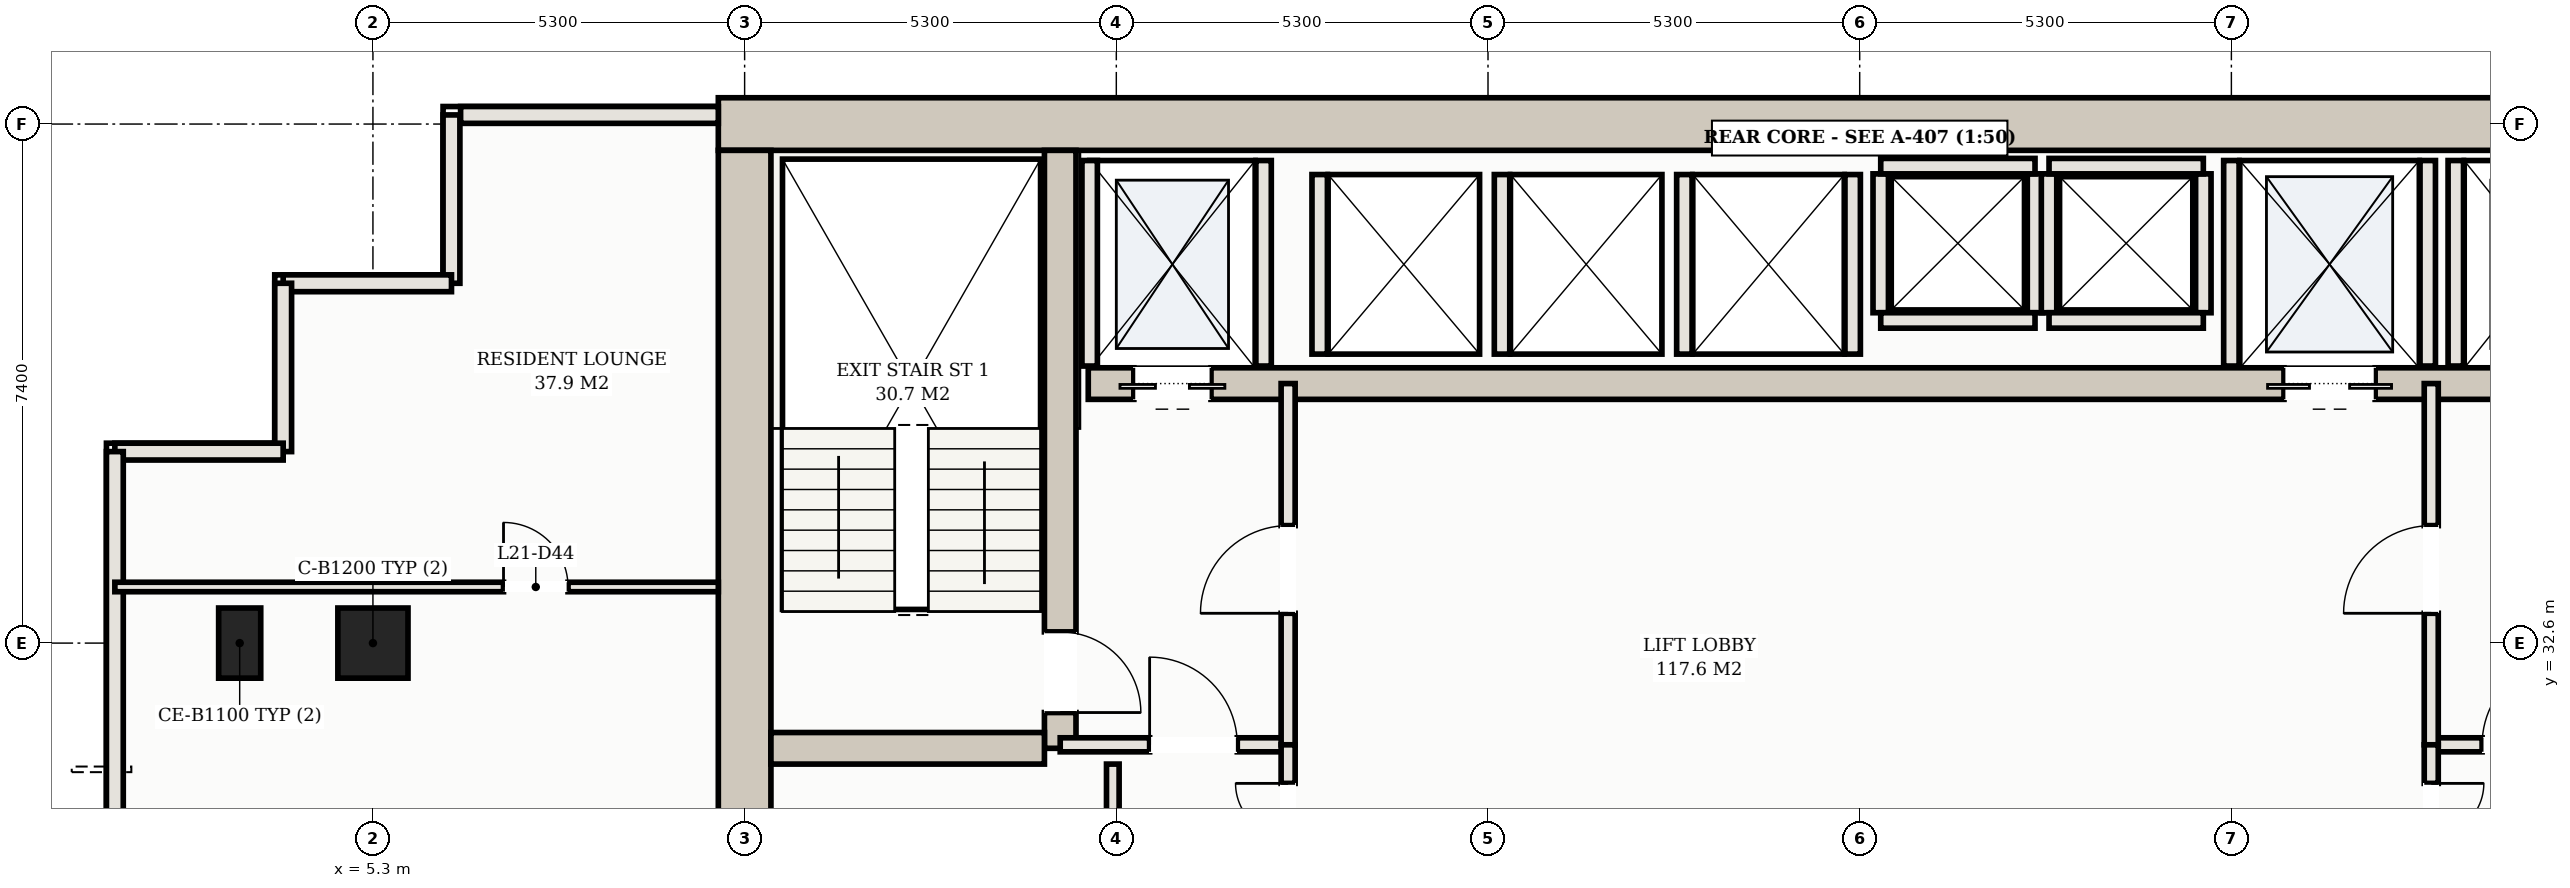
"""IFC4 building model, lengths in metres.
Left out: names, types, materials, properties, quantities, classifications, styles, units other than length and angle.
Written with IfcOpenShell. Run it as: python <this file> out.ifc"""

import sys

from ifc_helpers import new_model, si_unit, direction, frame, frame_2d, origin, origin_2d, place, context, subcontext, project, spatial, rectangle, hollow_rectangle, extrude, element, fill, save


model = new_model("IFC4")
c1 = context("Model", 3, precision=1e-05, world=origin(), true_north=direction((0.0, 1.0)))
c2 = subcontext(c1, "Body", "Model", "MODEL_VIEW")
j1 = project(units=[si_unit("LENGTHUNIT", "METRE"), si_unit("PLANEANGLEUNIT", "RADIAN")], contexts=[c1])
p1 = place(None, origin())
s1 = spatial("IfcSite", under=j1, at=p1, CompositionType="ELEMENT")
p2 = place(p1, origin())
s2 = spatial("IfcBuilding", under=s1, at=p2, CompositionType="ELEMENT")
p3 = place(p2, frame((0.0, 0.0, 81.7)))
s3 = spatial("IfcBuildingStorey", under=s2, at=p3, CompositionType="ELEMENT", Elevation=81.7)
p4 = place(p3, frame((10.225, 40.0, 0.0), z_axis=(0.0, 0.0, 1.0), x_axis=(1.0, 0.0, 0.0)))
e1 = element("IfcWall", 1, at=p4, inside=s3, PredefinedType="SHEAR", context=c2, shape_type="SweptSolid", body=[
    extrude(rectangle(XDim=32.55, YDim=0.75, at=frame_2d((16.275, 0.0))), origin(), (0.0, 0.0, 1.0), 3.09),
])
p5 = place(p3, frame((10.6, 25.575, 0.0), z_axis=(0.0, 0.0, 1.0), x_axis=(0.0, 1.0, 0.0)))
e2 = element("IfcWall", 2, at=p5, inside=s3, PredefinedType="SHEAR", context=c2, shape_type="SweptSolid", body=[
    extrude(rectangle(XDim=14.05, YDim=0.75, at=frame_2d((7.025, 0.0))), origin(), (0.0, 0.0, 1.0), 3.09),
])
p6 = place(p3, frame((15.1, 31.1, 0.0), z_axis=(0.0, 0.0, 1.0), x_axis=(0.0, 1.0, 0.0)))
e3 = element("IfcWall", 3, at=p6, inside=s3, PredefinedType="SHEAR", context=c2, shape_type="SweptSolid", body=[
    extrude(rectangle(XDim=8.525, YDim=0.45, at=frame_2d((4.262, 0.0))), origin(), (0.0, 0.0, 1.0), 3.09),
])
p7 = place(p6, frame((0.51, 0.0, 0.0)))
e4 = element("IfcOpeningElement", 4, at=p7, cuts=e3, PredefinedType="OPENING", context=c2, shape_type="SweptSolid", body=[
    extrude(rectangle(XDim=1.15, YDim=2.2, at=frame_2d((0.575, 1.1))), frame((0.0, 0.235, 0.0), z_axis=(0.0, -1.0, 0.0), x_axis=(1.0, 0.0, 0.0)), (0.0, 0.0, 1.0), 0.47),
])
p8 = place(p3, frame((10.975, 31.1, 0.0), z_axis=(0.0, 0.0, 1.0), x_axis=(1.0, 0.0, 0.0)))
e5 = element("IfcWall", 5, at=p8, inside=s3, PredefinedType="SHEAR", context=c2, shape_type="SweptSolid", body=[
    extrude(rectangle(XDim=3.9, YDim=0.45, at=frame_2d((1.95, 0.0))), origin(), (0.0, 0.0, 1.0), 3.09),
])
p9 = place(p3, frame((15.5, 36.3, 0.0), z_axis=(0.0, 0.0, 1.0), x_axis=(1.0, 0.0, 0.0)))
e6 = element("IfcWall", 6, at=p9, inside=s3, PredefinedType="SHEAR", context=c2, shape_type="SweptSolid", body=[
    extrude(rectangle(XDim=22.0, YDim=0.45, at=frame_2d((11.0, 0.0))), origin(), (0.0, 0.0, 1.0), 3.09),
])
p10 = place(p9, frame((0.65, 0.0, 0.0)))
e7 = element("IfcOpeningElement", 7, at=p10, cuts=e6, PredefinedType="OPENING", context=c2, shape_type="SweptSolid", body=[
    extrude(rectangle(XDim=1.1, YDim=2.15, at=frame_2d((0.55, 1.075))), frame((0.0, 0.235, 0.0), z_axis=(0.0, -1.0, 0.0), x_axis=(1.0, 0.0, 0.0)), (0.0, 0.0, 1.0), 0.47),
])
p11 = place(p9, frame((20.25, 0.0, 0.0)))
e8 = element("IfcOpeningElement", 8, at=p11, cuts=e6, PredefinedType="OPENING", context=c2, shape_type="SweptSolid", body=[
    extrude(rectangle(XDim=1.1, YDim=2.15, at=frame_2d((0.55, 1.075))), frame((0.0, 0.235, 0.0), z_axis=(0.0, -1.0, 0.0), x_axis=(1.0, 0.0, 0.0)), (0.0, 0.0, 1.0), 0.47),
])
p12 = place(p9, frame((17.05, 0.0, 0.0)))
e9 = element("IfcOpeningElement", 9, at=p12, cuts=e6, PredefinedType="OPENING", context=c2, shape_type="SweptSolid", body=[
    extrude(rectangle(XDim=1.3, YDim=2.2, at=frame_2d((0.65, 1.1))), frame((0.0, 0.235, 0.0), z_axis=(0.0, -1.0, 0.0), x_axis=(1.0, 0.0, 0.0)), (0.0, 0.0, 1.0), 0.47),
])
p13 = place(p3, frame((3.4, 32.6, 0.0), z_axis=(0.0, 0.0, 1.0), x_axis=(1.0, 0.0, 0.0)))
e10 = element("IfcColumn", 10, at=p13, inside=s3, PredefinedType="COLUMN", context=c2, shape_type="SweptSolid", body=[
    extrude(hollow_rectangle(XDim=0.6, YDim=1.0, WallThickness=0.032, at=origin_2d()), origin(), (0.0, 0.0, 1.0), 3.3),
])
p14 = place(p3, frame((5.3, 32.6, 0.0), z_axis=(0.0, 0.0, 1.0), x_axis=(1.0, 0.0, 0.0)))
e11 = element("IfcColumn", 11, at=p14, inside=s3, PredefinedType="COLUMN", context=c2, shape_type="SweptSolid", body=[
    extrude(hollow_rectangle(XDim=1.0, YDim=1.0, WallThickness=0.036, at=origin_2d()), origin(), (0.0, 0.0, 1.0), 3.3),
])
for number, where, z_axis, x_axis in (
    (12, (15.52, 36.55, 0.0), (0.0, 0.0, 1.0), (0.0, 1.0, 0.0)),
    (13, (18.0, 36.55, 0.0), (0.0, 0.0, 1.0), (0.0, 1.0, 0.0)),
    (14, (35.0, 36.55, 0.0), (0.0, 0.0, 1.0), (0.0, 1.0, 0.0)),
    (15, (31.8, 36.55, 0.0), (0.0, 0.0, 1.0), (0.0, 1.0, 0.0)),
    (16, (34.6, 36.55, 0.0), (0.0, 0.0, 1.0), (0.0, 1.0, 0.0)),
):
    element("IfcWall", number, at=place(p3, frame(where, z_axis=z_axis, x_axis=x_axis)), inside=s3, PredefinedType="SOLIDWALL", context=c2, shape_type="SweptSolid", body=[
        extrude(rectangle(XDim=2.93, YDim=0.22, at=frame_2d((1.465, 0.0))), origin(), (0.0, 0.0, 1.0), 3.09),
    ])
for number, where, z_axis, x_axis in (
    (17, (18.8, 36.72, 0.0), (0.0, 0.0, 1.0), (0.0, 1.0, 0.0)),
    (18, (21.4, 36.72, 0.0), (0.0, 0.0, 1.0), (0.0, 1.0, 0.0)),
    (19, (24.0, 36.72, 0.0), (0.0, 0.0, 1.0), (0.0, 1.0, 0.0)),
    (20, (26.4, 36.72, 0.0), (0.0, 0.0, 1.0), (0.0, 1.0, 0.0)),
):
    element("IfcWall", number, at=place(p3, frame(where, z_axis=z_axis, x_axis=x_axis)), inside=s3, PredefinedType="SOLIDWALL", context=c2, shape_type="SweptSolid", body=[
        extrude(rectangle(XDim=2.56, YDim=0.22, at=frame_2d((1.28, 0.0))), origin(), (0.0, 0.0, 1.0), 3.09),
    ])
for number, where, z_axis, x_axis in (
    (21, (26.8, 37.31, 0.0), (0.0, 0.0, 1.0), (0.0, 1.0, 0.0)),
    (22, (29.0, 37.31, 0.0), (0.0, 0.0, 1.0), (0.0, 1.0, 0.0)),
):
    element("IfcWall", number, at=place(p3, frame(where, z_axis=z_axis, x_axis=x_axis)), inside=s3, PredefinedType="SOLIDWALL", context=c2, shape_type="SweptSolid", body=[
        extrude(rectangle(XDim=1.98, YDim=0.22, at=frame_2d((0.99, 0.0))), origin(), (0.0, 0.0, 1.0), 3.09),
    ])
for number, where, z_axis, x_axis in (
    (23, (26.8, 39.4, 0.0), (0.0, 0.0, 1.0), (1.0, 0.0, 0.0)),
    (24, (26.8, 37.2, 0.0), (0.0, 0.0, 1.0), (1.0, 0.0, 0.0)),
):
    element("IfcWall", number, at=place(p3, frame(where, z_axis=z_axis, x_axis=x_axis)), inside=s3, PredefinedType="SOLIDWALL", context=c2, shape_type="SweptSolid", body=[
        extrude(rectangle(XDim=2.2, YDim=0.22, at=frame_2d((1.1, 0.0))), origin(), (0.0, 0.0, 1.0), 3.09),
    ])
for number, where, z_axis, x_axis in (
    (25, (29.2, 37.31, 0.0), (0.0, 0.0, 1.0), (0.0, 1.0, 0.0)),
    (26, (31.4, 37.31, 0.0), (0.0, 0.0, 1.0), (0.0, 1.0, 0.0)),
):
    element("IfcWall", number, at=place(p3, frame(where, z_axis=z_axis, x_axis=x_axis)), inside=s3, PredefinedType="SOLIDWALL", context=c2, shape_type="SweptSolid", body=[
        extrude(rectangle(XDim=1.98, YDim=0.22, at=frame_2d((0.99, 0.0))), origin(), (0.0, 0.0, 1.0), 3.09),
    ])
for number, where, z_axis, x_axis in (
    (27, (29.2, 39.4, 0.0), (0.0, 0.0, 1.0), (1.0, 0.0, 0.0)),
    (28, (29.2, 37.2, 0.0), (0.0, 0.0, 1.0), (1.0, 0.0, 0.0)),
):
    element("IfcWall", number, at=place(p3, frame(where, z_axis=z_axis, x_axis=x_axis)), inside=s3, PredefinedType="SOLIDWALL", context=c2, shape_type="SweptSolid", body=[
        extrude(rectangle(XDim=2.2, YDim=0.22, at=frame_2d((1.1, 0.0))), origin(), (0.0, 0.0, 1.0), 3.09),
    ])
p15 = place(p3, frame((10.225, 40.13, 0.0), z_axis=(0.0, 0.0, 1.0), x_axis=(-1.0, 0.0, 0.0)))
e29 = element("IfcWall", 29, at=p15, inside=s3, PredefinedType="SOLIDWALL", context=c2, shape_type="SweptSolid", body=[
    extrude(rectangle(XDim=3.675, YDim=0.24, at=frame_2d((1.837, 0.0))), origin(), (0.0, 0.0, 1.0), 3.09),
])
for number, where, z_axis, x_axis in (
    (30, (6.42, 40.13, 0.0), (0.0, 0.0, 1.0), (0.0, -1.0, 0.0)),
    (31, (6.42, 37.73, 0.0), (0.0, 0.0, 1.0), (-1.0, 0.0, 0.0)),
    (32, (4.02, 37.73, 0.0), (0.0, 0.0, 1.0), (0.0, -1.0, 0.0)),
    (33, (4.02, 35.33, 0.0), (0.0, 0.0, 1.0), (-1.0, 0.0, 0.0)),
):
    element("IfcWall", number, at=place(p3, frame(where, z_axis=z_axis, x_axis=x_axis)), inside=s3, PredefinedType="SOLIDWALL", context=c2, shape_type="SweptSolid", body=[
        extrude(rectangle(XDim=2.4, YDim=0.24, at=frame_2d((1.2, 0.0))), origin(), (0.0, 0.0, 1.0), 3.09),
    ])
p16 = place(p3, frame((1.62, 35.33, 0.0), z_axis=(0.0, 0.0, 1.0), x_axis=(0.0, -1.0, 0.0)))
e34 = element("IfcWall", 34, at=p16, inside=s3, PredefinedType="SOLIDWALL", context=c2, shape_type="SweptSolid", body=[
    extrude(rectangle(XDim=28.41, YDim=0.24, at=frame_2d((14.205, 0.0))), origin(), (0.0, 0.0, 1.0), 3.09),
])
p17 = place(p3, frame((15.1, 31.15, 0.0), z_axis=(0.0, 0.0, 1.0), x_axis=(1.0, 0.0, 0.0)))
e35 = element("IfcWall", 35, at=p17, inside=s3, PredefinedType="PARTITIONING", context=c2, shape_type="SweptSolid", body=[
    extrude(rectangle(XDim=3.25, YDim=0.2, at=frame_2d((1.625, 0.0))), origin(), (0.0, 0.0, 1.0), 2.38),
])
p18 = place(p17, frame((1.275, 0.0, 0.0)))
e36 = element("IfcOpeningElement", 36, at=p18, cuts=e35, PredefinedType="OPENING", context=c2, shape_type="SweptSolid", body=[
    extrude(rectangle(XDim=1.25, YDim=2.2, at=frame_2d((0.625, 1.1))), frame((0.0, 0.11, 0.0), z_axis=(0.0, -1.0, 0.0), x_axis=(1.0, 0.0, 0.0)), (0.0, 0.0, 1.0), 0.22),
])
p19 = place(p3, frame((18.35, 31.15, 0.0), z_axis=(0.0, 0.0, 1.0), x_axis=(0.0, 1.0, 0.0)))
e37 = element("IfcWall", 37, at=p19, inside=s3, PredefinedType="PARTITIONING", context=c2, shape_type="SweptSolid", body=[
    extrude(rectangle(XDim=5.15, YDim=0.2, at=frame_2d((2.575, 0.0))), origin(), (0.0, 0.0, 1.0), 2.38),
])
p20 = place(p19, frame((1.875, 0.0, 0.0)))
e38 = element("IfcOpeningElement", 38, at=p20, cuts=e37, PredefinedType="OPENING", context=c2, shape_type="SweptSolid", body=[
    extrude(rectangle(XDim=1.25, YDim=2.2, at=frame_2d((0.625, 1.1))), frame((0.0, 0.11, 0.0), z_axis=(0.0, -1.0, 0.0), x_axis=(1.0, 0.0, 0.0)), (0.0, 0.0, 1.0), 0.22),
])
p21 = place(p3, frame((34.65, 31.15, 0.0), z_axis=(0.0, 0.0, 1.0), x_axis=(1.0, 0.0, 0.0)))
e39 = element("IfcWall", 39, at=p21, inside=s3, PredefinedType="PARTITIONING", context=c2, shape_type="SweptSolid", body=[
    extrude(rectangle(XDim=3.25, YDim=0.2, at=frame_2d((1.625, 0.0))), origin(), (0.0, 0.0, 1.0), 2.38),
])
p22 = place(p21, frame((0.725, 0.0, 0.0)))
e40 = element("IfcOpeningElement", 40, at=p22, cuts=e39, PredefinedType="OPENING", context=c2, shape_type="SweptSolid", body=[
    extrude(rectangle(XDim=1.25, YDim=2.2, at=frame_2d((0.625, 1.1))), frame((0.0, 0.11, 0.0), z_axis=(0.0, -1.0, 0.0), x_axis=(1.0, 0.0, 0.0)), (0.0, 0.0, 1.0), 0.22),
])
p23 = place(p3, frame((34.65, 31.15, 0.0), z_axis=(0.0, 0.0, 1.0), x_axis=(0.0, 1.0, 0.0)))
e41 = element("IfcWall", 41, at=p23, inside=s3, PredefinedType="PARTITIONING", context=c2, shape_type="SweptSolid", body=[
    extrude(rectangle(XDim=5.15, YDim=0.2, at=frame_2d((2.575, 0.0))), origin(), (0.0, 0.0, 1.0), 2.38),
])
p24 = place(p23, frame((1.875, 0.0, 0.0)))
e42 = element("IfcOpeningElement", 42, at=p24, cuts=e41, PredefinedType="OPENING", context=c2, shape_type="SweptSolid", body=[
    extrude(rectangle(XDim=1.25, YDim=2.2, at=frame_2d((0.625, 1.1))), frame((0.0, 0.11, 0.0), z_axis=(0.0, -1.0, 0.0), x_axis=(1.0, 0.0, 0.0)), (0.0, 0.0, 1.0), 0.22),
])
p25 = place(p3, frame((15.85, 25.575, 0.0), z_axis=(0.0, 0.0, 1.0), x_axis=(0.0, 1.0, 0.0)))
e43 = element("IfcWall", 43, at=p25, inside=s3, PredefinedType="PARTITIONING", context=c2, shape_type="SweptSolid", body=[
    extrude(rectangle(XDim=5.3, YDim=0.18, at=frame_2d((2.65, 0.0))), origin(), (0.0, 0.0, 1.0), 2.38),
])
p26 = place(p25, frame((2.19, 0.0, 0.0)))
e44 = element("IfcOpeningElement", 44, at=p26, cuts=e43, PredefinedType="OPENING", context=c2, shape_type="SweptSolid", body=[
    extrude(rectangle(XDim=0.92, YDim=2.15, at=frame_2d((0.46, 1.075))), frame((0.0, 0.1, 0.0), z_axis=(0.0, -1.0, 0.0), x_axis=(1.0, 0.0, 0.0)), (0.0, 0.0, 1.0), 0.2),
])
p27 = place(p3, frame((18.35, 28.55, 0.0), z_axis=(0.0, 0.0, 1.0), x_axis=(0.0, 1.0, 0.0)))
e45 = element("IfcWall", 45, at=p27, inside=s3, PredefinedType="PARTITIONING", context=c2, shape_type="SweptSolid", body=[
    extrude(rectangle(XDim=2.6, YDim=0.2, at=frame_2d((1.3, 0.0))), origin(), (0.0, 0.0, 1.0), 2.38),
])
p28 = place(p27, frame((0.55, 0.0, 0.0)))
e46 = element("IfcOpeningElement", 46, at=p28, cuts=e45, PredefinedType="OPENING", context=c2, shape_type="SweptSolid", body=[
    extrude(rectangle(XDim=1.5, YDim=2.25, at=frame_2d((0.75, 1.125))), frame((0.0, 0.11, 0.0), z_axis=(0.0, -1.0, 0.0), x_axis=(1.0, 0.0, 0.0)), (0.0, 0.0, 1.0), 0.22),
])
p29 = place(p3, frame((34.65, 28.55, 0.0), z_axis=(0.0, 0.0, 1.0), x_axis=(0.0, 1.0, 0.0)))
e47 = element("IfcWall", 47, at=p29, inside=s3, PredefinedType="PARTITIONING", context=c2, shape_type="SweptSolid", body=[
    extrude(rectangle(XDim=2.6, YDim=0.2, at=frame_2d((1.3, 0.0))), origin(), (0.0, 0.0, 1.0), 2.38),
])
p30 = place(p29, frame((0.55, 0.0, 0.0)))
e48 = element("IfcOpeningElement", 48, at=p30, cuts=e47, PredefinedType="OPENING", context=c2, shape_type="SweptSolid", body=[
    extrude(rectangle(XDim=1.5, YDim=2.25, at=frame_2d((0.75, 1.125))), frame((0.0, 0.11, 0.0), z_axis=(0.0, -1.0, 0.0), x_axis=(1.0, 0.0, 0.0)), (0.0, 0.0, 1.0), 0.22),
])
p31 = place(p3, frame((1.62, 33.4, 0.0), z_axis=(0.0, 0.0, 1.0), x_axis=(1.0, 0.0, 0.0)))
e49 = element("IfcWall", 49, at=p31, inside=s3, PredefinedType="PARTITIONING", context=c2, shape_type="SweptSolid", body=[
    extrude(rectangle(XDim=8.605, YDim=0.135, at=frame_2d((4.302, 0.0))), origin(), (0.0, 0.0, 1.0), 2.38),
])
p32 = place(p31, frame((5.542, 0.0, 0.0)))
e50 = element("IfcOpeningElement", 50, at=p32, cuts=e49, PredefinedType="OPENING", context=c2, shape_type="SweptSolid", body=[
    extrude(rectangle(XDim=0.92, YDim=2.15, at=frame_2d((0.46, 1.075))), frame((0.0, 0.078, 0.0), z_axis=(0.0, -1.0, 0.0), x_axis=(1.0, 0.0, 0.0)), (0.0, 0.0, 1.0), 0.155),
])
p33 = place(p10, frame((1.1, 0.0, 0.0), z_axis=(0.0, 0.0, 1.0), x_axis=(-1.0, 0.0, 0.0)))
e51 = element("IfcDoor", 51, at=p33, inside=s3, OperationType="DOUBLE_DOOR_SLIDING", PredefinedType="DOOR", context=c2, shape_type="SweptSolid", body=[
    extrude(rectangle(XDim=1.1, YDim=2.15, at=frame_2d((0.55, 1.075))), frame((0.0, 0.025, 0.0), z_axis=(0.0, -1.0, 0.0), x_axis=(1.0, 0.0, 0.0)), (0.0, 0.0, 1.0), 0.05),
])
fill(e7, e51)
p34 = place(p12, frame((1.3, 0.0, 0.0), z_axis=(0.0, 0.0, 1.0), x_axis=(-1.0, 0.0, 0.0)))
e52 = element("IfcDoor", 52, at=p34, inside=s3, OperationType="DOUBLE_DOOR_SLIDING", PredefinedType="DOOR", context=c2, shape_type="SweptSolid", body=[
    extrude(rectangle(XDim=1.3, YDim=2.2, at=frame_2d((0.65, 1.1))), frame((0.0, 0.025, 0.0), z_axis=(0.0, -1.0, 0.0), x_axis=(1.0, 0.0, 0.0)), (0.0, 0.0, 1.0), 0.05),
])
fill(e9, e52)
p35 = place(p18, origin())
e53 = element("IfcDoor", 53, at=p35, inside=s3, OperationType="SINGLE_SWING_LEFT", PredefinedType="DOOR", context=c2, shape_type="SweptSolid", body=[
    extrude(rectangle(XDim=1.25, YDim=2.2, at=frame_2d((0.625, 1.1))), frame((0.0, 0.025, 0.0), z_axis=(0.0, -1.0, 0.0), x_axis=(1.0, 0.0, 0.0)), (0.0, 0.0, 1.0), 0.05),
])
fill(e36, e53)
p36 = place(p20, origin())
e54 = element("IfcDoor", 54, at=p36, inside=s3, OperationType="SINGLE_SWING_LEFT", PredefinedType="DOOR", context=c2, shape_type="SweptSolid", body=[
    extrude(rectangle(XDim=1.25, YDim=2.2, at=frame_2d((0.625, 1.1))), frame((0.0, 0.025, 0.0), z_axis=(0.0, -1.0, 0.0), x_axis=(1.0, 0.0, 0.0)), (0.0, 0.0, 1.0), 0.05),
])
fill(e38, e54)
p37 = place(p22, origin())
e55 = element("IfcDoor", 55, at=p37, inside=s3, OperationType="SINGLE_SWING_RIGHT", PredefinedType="DOOR", context=c2, shape_type="SweptSolid", body=[
    extrude(rectangle(XDim=1.25, YDim=2.2, at=frame_2d((0.625, 1.1))), frame((0.0, 0.025, 0.0), z_axis=(0.0, -1.0, 0.0), x_axis=(1.0, 0.0, 0.0)), (0.0, 0.0, 1.0), 0.05),
])
fill(e40, e55)
p38 = place(p24, origin())
e56 = element("IfcDoor", 56, at=p38, inside=s3, OperationType="SINGLE_SWING_LEFT", PredefinedType="DOOR", context=c2, shape_type="SweptSolid", body=[
    extrude(rectangle(XDim=1.25, YDim=2.2, at=frame_2d((0.625, 1.1))), frame((0.0, 0.025, 0.0), z_axis=(0.0, -1.0, 0.0), x_axis=(1.0, 0.0, 0.0)), (0.0, 0.0, 1.0), 0.05),
])
fill(e42, e56)
p39 = place(p7, frame((1.15, 0.0, 0.0), z_axis=(0.0, 0.0, 1.0), x_axis=(-1.0, 0.0, 0.0)))
e57 = element("IfcDoor", 57, at=p39, inside=s3, OperationType="SINGLE_SWING_RIGHT", PredefinedType="DOOR", context=c2, shape_type="SweptSolid", body=[
    extrude(rectangle(XDim=1.15, YDim=2.2, at=frame_2d((0.575, 1.1))), frame((0.0, 0.025, 0.0), z_axis=(0.0, -1.0, 0.0), x_axis=(1.0, 0.0, 0.0)), (0.0, 0.0, 1.0), 0.05),
])
fill(e4, e57)
p40 = place(p28, origin())
e58 = element("IfcDoor", 58, at=p40, inside=s3, OperationType="DOUBLE_DOOR_SINGLE_SWING", PredefinedType="DOOR", context=c2, shape_type="SweptSolid", body=[
    extrude(rectangle(XDim=1.5, YDim=2.25, at=frame_2d((0.75, 1.125))), frame((0.0, 0.025, 0.0), z_axis=(0.0, -1.0, 0.0), x_axis=(1.0, 0.0, 0.0)), (0.0, 0.0, 1.0), 0.05),
])
fill(e46, e58)
p41 = place(p30, frame((1.5, 0.0, 0.0), z_axis=(0.0, 0.0, 1.0), x_axis=(-1.0, 0.0, 0.0)))
e59 = element("IfcDoor", 59, at=p41, inside=s3, OperationType="DOUBLE_DOOR_SINGLE_SWING", PredefinedType="DOOR", context=c2, shape_type="SweptSolid", body=[
    extrude(rectangle(XDim=1.5, YDim=2.25, at=frame_2d((0.75, 1.125))), frame((0.0, 0.025, 0.0), z_axis=(0.0, -1.0, 0.0), x_axis=(1.0, 0.0, 0.0)), (0.0, 0.0, 1.0), 0.05),
])
fill(e48, e59)
p42 = place(p32, origin())
e60 = element("IfcDoor", 60, at=p42, inside=s3, OperationType="SINGLE_SWING_LEFT", PredefinedType="DOOR", context=c2, shape_type="SweptSolid", body=[
    extrude(rectangle(XDim=0.92, YDim=2.15, at=frame_2d((0.46, 1.075))), frame((0.0, 0.025, 0.0), z_axis=(0.0, -1.0, 0.0), x_axis=(1.0, 0.0, 0.0)), (0.0, 0.0, 1.0), 0.05),
])
fill(e50, e60)
save(model, sys.argv[1])
